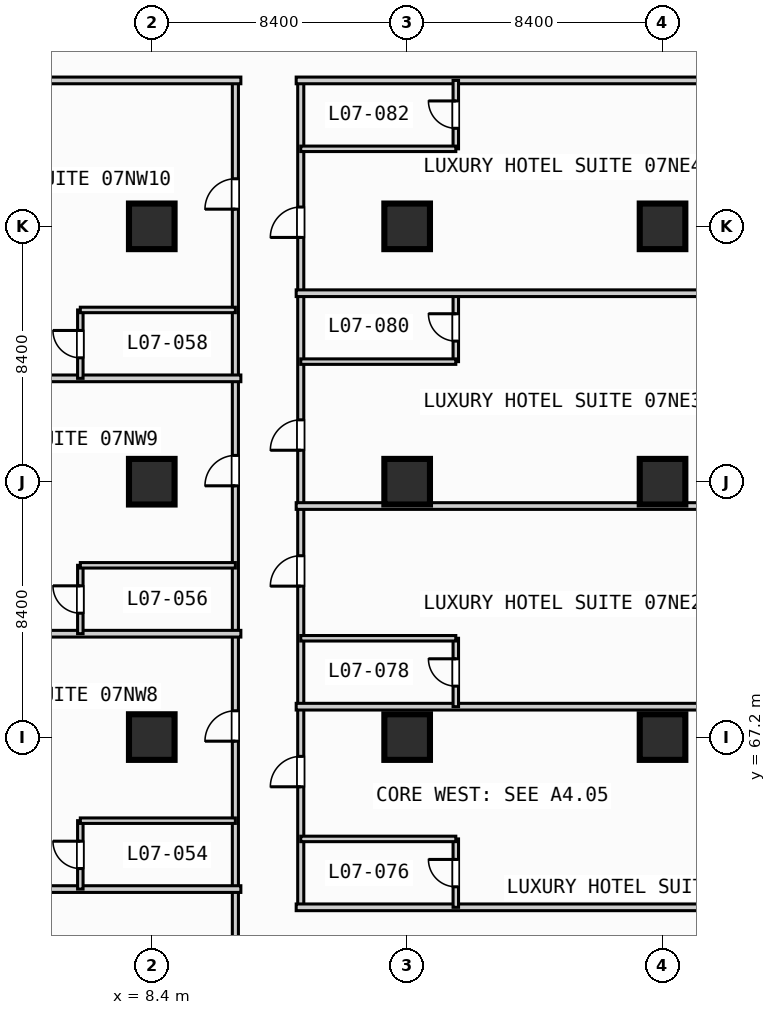
"""IFC4 building model, lengths in metres.
Left out: names, types, materials, properties, quantities, classifications, styles, units other than length and angle.
Written with IfcOpenShell. Run it as: python <this file> out.ifc"""

import sys

from ifc_helpers import new_model, si_unit, direction, frame, frame_2d, origin, origin_2d, place, context, subcontext, project, spatial, rectangle, extrude, element, fill, save


model = new_model("IFC4")
c1 = context("Model", 3, precision=1e-05, world=origin(), true_north=direction((0.0, 1.0)))
c2 = subcontext(c1, "Body", "Model", "MODEL_VIEW")
j1 = project(units=[si_unit("LENGTHUNIT", "METRE"), si_unit("PLANEANGLEUNIT", "RADIAN")], contexts=[c1])
p1 = place(None, origin())
s1 = spatial("IfcSite", under=j1, at=p1, CompositionType="ELEMENT")
p2 = place(p1, origin())
s2 = spatial("IfcBuilding", under=s1, at=p2, CompositionType="ELEMENT")
p3 = place(p2, frame((0.0, 0.0, 35.8)))
s3 = spatial("IfcBuildingStorey", under=s2, at=p3, CompositionType="ELEMENT", Elevation=35.8)
for number, where, z_axis, x_axis in (
    (1, (8.4, 67.2, 0.0), (0.0, 0.0, 1.0), (1.0, 0.0, 0.0)),
    (2, (8.4, 75.6, 0.0), (0.0, 0.0, 1.0), (1.0, 0.0, 0.0)),
    (3, (8.4, 84.0, 0.0), (0.0, 0.0, 1.0), (1.0, 0.0, 0.0)),
    (4, (16.8, 67.2, 0.0), (0.0, 0.0, 1.0), (1.0, 0.0, 0.0)),
    (5, (16.8, 75.6, 0.0), (0.0, 0.0, 1.0), (1.0, 0.0, 0.0)),
    (6, (16.8, 84.0, 0.0), (0.0, 0.0, 1.0), (1.0, 0.0, 0.0)),
    (7, (25.2, 67.2, 0.0), (0.0, 0.0, 1.0), (1.0, 0.0, 0.0)),
    (8, (25.2, 75.6, 0.0), (0.0, 0.0, 1.0), (1.0, 0.0, 0.0)),
    (9, (25.2, 84.0, 0.0), (0.0, 0.0, 1.0), (1.0, 0.0, 0.0)),
):
    element("IfcColumn", number, at=place(p3, frame(where, z_axis=z_axis, x_axis=x_axis)), inside=s3, PredefinedType="COLUMN", context=c2, shape_type="SweptSolid", body=[
        extrude(rectangle(XDim=1.5, YDim=1.5, at=origin_2d()), origin(), (0.0, 0.0, 1.0), 3.8),
    ])
p4 = place(p3, frame((11.15, 3.4, 0.0), z_axis=(0.0, 0.0, 1.0), x_axis=(0.0, 1.0, 0.0)))
e10 = element("IfcWall", 10, at=p4, inside=s3, PredefinedType="PARTITIONING", context=c2, shape_type="SweptSolid", body=[
    extrude(rectangle(XDim=85.4, YDim=0.2, at=frame_2d((42.7, 0.0))), origin(), (0.0, 0.0, 1.0), 3.55),
])
p5 = place(p4, frame((4.865, 0.0, 0.0)))
e11 = element("IfcOpeningElement", 11, at=p5, cuts=e10, PredefinedType="OPENING", context=c2, shape_type="SweptSolid", body=[
    extrude(rectangle(XDim=1.0, YDim=2.15, at=frame_2d((0.5, 1.075))), frame((0.0, 0.11, 0.0), z_axis=(0.0, -1.0, 0.0), x_axis=(1.0, 0.0, 0.0)), (0.0, 0.0, 1.0), 0.22),
])
p6 = place(p4, frame((13.265, 0.0, 0.0)))
e12 = element("IfcOpeningElement", 12, at=p6, cuts=e10, PredefinedType="OPENING", context=c2, shape_type="SweptSolid", body=[
    extrude(rectangle(XDim=1.0, YDim=2.15, at=frame_2d((0.5, 1.075))), frame((0.0, 0.11, 0.0), z_axis=(0.0, -1.0, 0.0), x_axis=(1.0, 0.0, 0.0)), (0.0, 0.0, 1.0), 0.22),
])
p7 = place(p4, frame((21.665, 0.0, 0.0)))
e13 = element("IfcOpeningElement", 13, at=p7, cuts=e10, PredefinedType="OPENING", context=c2, shape_type="SweptSolid", body=[
    extrude(rectangle(XDim=1.0, YDim=2.15, at=frame_2d((0.5, 1.075))), frame((0.0, 0.11, 0.0), z_axis=(0.0, -1.0, 0.0), x_axis=(1.0, 0.0, 0.0)), (0.0, 0.0, 1.0), 0.22),
])
p8 = place(p4, frame((30.065, 0.0, 0.0)))
e14 = element("IfcOpeningElement", 14, at=p8, cuts=e10, PredefinedType="OPENING", context=c2, shape_type="SweptSolid", body=[
    extrude(rectangle(XDim=1.0, YDim=2.15, at=frame_2d((0.5, 1.075))), frame((0.0, 0.11, 0.0), z_axis=(0.0, -1.0, 0.0), x_axis=(1.0, 0.0, 0.0)), (0.0, 0.0, 1.0), 0.22),
])
p9 = place(p4, frame((38.465, 0.0, 0.0)))
e15 = element("IfcOpeningElement", 15, at=p9, cuts=e10, PredefinedType="OPENING", context=c2, shape_type="SweptSolid", body=[
    extrude(rectangle(XDim=1.0, YDim=2.15, at=frame_2d((0.5, 1.075))), frame((0.0, 0.11, 0.0), z_axis=(0.0, -1.0, 0.0), x_axis=(1.0, 0.0, 0.0)), (0.0, 0.0, 1.0), 0.22),
])
p10 = place(p4, frame((46.865, 0.0, 0.0)))
e16 = element("IfcOpeningElement", 16, at=p10, cuts=e10, PredefinedType="OPENING", context=c2, shape_type="SweptSolid", body=[
    extrude(rectangle(XDim=1.0, YDim=2.15, at=frame_2d((0.5, 1.075))), frame((0.0, 0.11, 0.0), z_axis=(0.0, -1.0, 0.0), x_axis=(1.0, 0.0, 0.0)), (0.0, 0.0, 1.0), 0.22),
])
p11 = place(p4, frame((55.265, 0.0, 0.0)))
e17 = element("IfcOpeningElement", 17, at=p11, cuts=e10, PredefinedType="OPENING", context=c2, shape_type="SweptSolid", body=[
    extrude(rectangle(XDim=1.0, YDim=2.15, at=frame_2d((0.5, 1.075))), frame((0.0, 0.11, 0.0), z_axis=(0.0, -1.0, 0.0), x_axis=(1.0, 0.0, 0.0)), (0.0, 0.0, 1.0), 0.22),
])
p12 = place(p4, frame((63.665, 0.0, 0.0)))
e18 = element("IfcOpeningElement", 18, at=p12, cuts=e10, PredefinedType="OPENING", context=c2, shape_type="SweptSolid", body=[
    extrude(rectangle(XDim=1.0, YDim=2.15, at=frame_2d((0.5, 1.075))), frame((0.0, 0.11, 0.0), z_axis=(0.0, -1.0, 0.0), x_axis=(1.0, 0.0, 0.0)), (0.0, 0.0, 1.0), 0.22),
])
p13 = place(p4, frame((72.065, 0.0, 0.0)))
e19 = element("IfcOpeningElement", 19, at=p13, cuts=e10, PredefinedType="OPENING", context=c2, shape_type="SweptSolid", body=[
    extrude(rectangle(XDim=1.0, YDim=2.15, at=frame_2d((0.5, 1.075))), frame((0.0, 0.11, 0.0), z_axis=(0.0, -1.0, 0.0), x_axis=(1.0, 0.0, 0.0)), (0.0, 0.0, 1.0), 0.22),
])
p14 = place(p4, frame((81.165, 0.0, 0.0)))
e20 = element("IfcOpeningElement", 20, at=p14, cuts=e10, PredefinedType="OPENING", context=c2, shape_type="SweptSolid", body=[
    extrude(rectangle(XDim=1.0, YDim=2.15, at=frame_2d((0.5, 1.075))), frame((0.0, 0.11, 0.0), z_axis=(0.0, -1.0, 0.0), x_axis=(1.0, 0.0, 0.0)), (0.0, 0.0, 1.0), 0.22),
])
p15 = place(p3, frame((0.2, 62.2, 0.0), z_axis=(0.0, 0.0, 1.0), x_axis=(1.0, 0.0, 0.0)))
e21 = element("IfcWall", 21, at=p15, inside=s3, PredefinedType="PARTITIONING", context=c2, shape_type="SweptSolid", body=[
    extrude(rectangle(XDim=11.13, YDim=0.22, at=frame_2d((5.565, 0.0))), origin(), (0.0, 0.0, 1.0), 3.55),
])
p16 = place(p3, frame((6.05, 62.2, 0.0), z_axis=(0.0, 0.0, 1.0), x_axis=(0.0, 1.0, 0.0)))
e22 = element("IfcWall", 22, at=p16, inside=s3, PredefinedType="PLUMBINGWALL", context=c2, shape_type="SweptSolid", body=[
    extrude(rectangle(XDim=2.25, YDim=0.18, at=frame_2d((1.125, 0.0))), origin(), (0.0, 0.0, 1.0), 3.55),
])
p17 = place(p16, frame((0.675, 0.0, 0.0)))
e23 = element("IfcOpeningElement", 23, at=p17, cuts=e22, PredefinedType="OPENING", context=c2, shape_type="SweptSolid", body=[
    extrude(rectangle(XDim=0.9, YDim=2.1, at=frame_2d((0.45, 1.05))), frame((0.0, 0.1, 0.0), z_axis=(0.0, -1.0, 0.0), x_axis=(1.0, 0.0, 0.0)), (0.0, 0.0, 1.0), 0.2),
])
p18 = place(p3, frame((6.05, 64.45, 0.0), z_axis=(0.0, 0.0, 1.0), x_axis=(1.0, 0.0, 0.0)))
e24 = element("IfcWall", 24, at=p18, inside=s3, PredefinedType="PLUMBINGWALL", context=c2, shape_type="SweptSolid", body=[
    extrude(rectangle(XDim=5.1, YDim=0.18, at=frame_2d((2.55, 0.0))), origin(), (0.0, 0.0, 1.0), 3.55),
])
p19 = place(p3, frame((0.2, 70.6, 0.0), z_axis=(0.0, 0.0, 1.0), x_axis=(1.0, 0.0, 0.0)))
e25 = element("IfcWall", 25, at=p19, inside=s3, PredefinedType="PARTITIONING", context=c2, shape_type="SweptSolid", body=[
    extrude(rectangle(XDim=11.13, YDim=0.22, at=frame_2d((5.565, 0.0))), origin(), (0.0, 0.0, 1.0), 3.55),
])
p20 = place(p3, frame((6.05, 70.6, 0.0), z_axis=(0.0, 0.0, 1.0), x_axis=(0.0, 1.0, 0.0)))
e26 = element("IfcWall", 26, at=p20, inside=s3, PredefinedType="PLUMBINGWALL", context=c2, shape_type="SweptSolid", body=[
    extrude(rectangle(XDim=2.25, YDim=0.18, at=frame_2d((1.125, 0.0))), origin(), (0.0, 0.0, 1.0), 3.55),
])
p21 = place(p20, frame((0.675, 0.0, 0.0)))
e27 = element("IfcOpeningElement", 27, at=p21, cuts=e26, PredefinedType="OPENING", context=c2, shape_type="SweptSolid", body=[
    extrude(rectangle(XDim=0.9, YDim=2.1, at=frame_2d((0.45, 1.05))), frame((0.0, 0.1, 0.0), z_axis=(0.0, -1.0, 0.0), x_axis=(1.0, 0.0, 0.0)), (0.0, 0.0, 1.0), 0.2),
])
p22 = place(p3, frame((6.05, 72.85, 0.0), z_axis=(0.0, 0.0, 1.0), x_axis=(1.0, 0.0, 0.0)))
e28 = element("IfcWall", 28, at=p22, inside=s3, PredefinedType="PLUMBINGWALL", context=c2, shape_type="SweptSolid", body=[
    extrude(rectangle(XDim=5.1, YDim=0.18, at=frame_2d((2.55, 0.0))), origin(), (0.0, 0.0, 1.0), 3.55),
])
for number, where, z_axis, x_axis in (
    (29, (0.2, 79.0, 0.0), (0.0, 0.0, 1.0), (1.0, 0.0, 0.0)),
    (30, (0.2, 88.8, 0.0), (0.0, 0.0, 1.0), (1.0, 0.0, 0.0)),
):
    element("IfcWall", number, at=place(p3, frame(where, z_axis=z_axis, x_axis=x_axis)), inside=s3, PredefinedType="PARTITIONING", context=c2, shape_type="SweptSolid", body=[
        extrude(rectangle(XDim=11.13, YDim=0.22, at=frame_2d((5.565, 0.0))), origin(), (0.0, 0.0, 1.0), 3.55),
    ])
p23 = place(p3, frame((6.05, 79.0, 0.0), z_axis=(0.0, 0.0, 1.0), x_axis=(0.0, 1.0, 0.0)))
e31 = element("IfcWall", 31, at=p23, inside=s3, PredefinedType="PLUMBINGWALL", context=c2, shape_type="SweptSolid", body=[
    extrude(rectangle(XDim=2.25, YDim=0.18, at=frame_2d((1.125, 0.0))), origin(), (0.0, 0.0, 1.0), 3.55),
])
p24 = place(p23, frame((0.675, 0.0, 0.0)))
e32 = element("IfcOpeningElement", 32, at=p24, cuts=e31, PredefinedType="OPENING", context=c2, shape_type="SweptSolid", body=[
    extrude(rectangle(XDim=0.9, YDim=2.1, at=frame_2d((0.45, 1.05))), frame((0.0, 0.1, 0.0), z_axis=(0.0, -1.0, 0.0), x_axis=(1.0, 0.0, 0.0)), (0.0, 0.0, 1.0), 0.2),
])
p25 = place(p3, frame((6.05, 81.25, 0.0), z_axis=(0.0, 0.0, 1.0), x_axis=(1.0, 0.0, 0.0)))
e33 = element("IfcWall", 33, at=p25, inside=s3, PredefinedType="PLUMBINGWALL", context=c2, shape_type="SweptSolid", body=[
    extrude(rectangle(XDim=5.1, YDim=0.18, at=frame_2d((2.55, 0.0))), origin(), (0.0, 0.0, 1.0), 3.55),
])
p26 = place(p3, frame((13.3, 61.6, 0.0), z_axis=(0.0, 0.0, 1.0), x_axis=(0.0, 1.0, 0.0)))
e34 = element("IfcWall", 34, at=p26, inside=s3, PredefinedType="PARTITIONING", context=c2, shape_type="SweptSolid", body=[
    extrude(rectangle(XDim=27.2, YDim=0.2, at=frame_2d((13.6, 0.0))), origin(), (0.0, 0.0, 1.0), 3.55),
])
p27 = place(p26, frame((3.965, 0.0, 0.0)))
e35 = element("IfcOpeningElement", 35, at=p27, cuts=e34, PredefinedType="OPENING", context=c2, shape_type="SweptSolid", body=[
    extrude(rectangle(XDim=1.0, YDim=2.15, at=frame_2d((0.5, 1.075))), frame((0.0, 0.11, 0.0), z_axis=(0.0, -1.0, 0.0), x_axis=(1.0, 0.0, 0.0)), (0.0, 0.0, 1.0), 0.22),
])
p28 = place(p26, frame((10.565, 0.0, 0.0)))
e36 = element("IfcOpeningElement", 36, at=p28, cuts=e34, PredefinedType="OPENING", context=c2, shape_type="SweptSolid", body=[
    extrude(rectangle(XDim=1.0, YDim=2.15, at=frame_2d((0.5, 1.075))), frame((0.0, 0.11, 0.0), z_axis=(0.0, -1.0, 0.0), x_axis=(1.0, 0.0, 0.0)), (0.0, 0.0, 1.0), 0.22),
])
p29 = place(p26, frame((15.035, 0.0, 0.0)))
e37 = element("IfcOpeningElement", 37, at=p29, cuts=e34, PredefinedType="OPENING", context=c2, shape_type="SweptSolid", body=[
    extrude(rectangle(XDim=1.0, YDim=2.15, at=frame_2d((0.5, 1.075))), frame((0.0, 0.11, 0.0), z_axis=(0.0, -1.0, 0.0), x_axis=(1.0, 0.0, 0.0)), (0.0, 0.0, 1.0), 0.22),
])
p30 = place(p26, frame((22.035, 0.0, 0.0)))
e38 = element("IfcOpeningElement", 38, at=p30, cuts=e34, PredefinedType="OPENING", context=c2, shape_type="SweptSolid", body=[
    extrude(rectangle(XDim=1.0, YDim=2.15, at=frame_2d((0.5, 1.075))), frame((0.0, 0.11, 0.0), z_axis=(0.0, -1.0, 0.0), x_axis=(1.0, 0.0, 0.0)), (0.0, 0.0, 1.0), 0.22),
])
p31 = place(p3, frame((13.15, 61.6, 0.0), z_axis=(0.0, 0.0, 1.0), x_axis=(1.0, 0.0, 0.0)))
e39 = element("IfcWall", 39, at=p31, inside=s3, PredefinedType="PARTITIONING", context=c2, shape_type="SweptSolid", body=[
    extrude(rectangle(XDim=20.28, YDim=0.22, at=frame_2d((10.14, 0.0))), origin(), (0.0, 0.0, 1.0), 3.55),
])
p32 = place(p3, frame((18.4, 61.6, 0.0), z_axis=(0.0, 0.0, 1.0), x_axis=(0.0, 1.0, 0.0)))
e40 = element("IfcWall", 40, at=p32, inside=s3, PredefinedType="PLUMBINGWALL", context=c2, shape_type="SweptSolid", body=[
    extrude(rectangle(XDim=2.25, YDim=0.18, at=frame_2d((1.125, 0.0))), origin(), (0.0, 0.0, 1.0), 3.55),
])
p33 = place(p32, frame((0.675, 0.0, 0.0)))
e41 = element("IfcOpeningElement", 41, at=p33, cuts=e40, PredefinedType="OPENING", context=c2, shape_type="SweptSolid", body=[
    extrude(rectangle(XDim=0.9, YDim=2.1, at=frame_2d((0.45, 1.05))), frame((0.0, 0.1, 0.0), z_axis=(0.0, -1.0, 0.0), x_axis=(1.0, 0.0, 0.0)), (0.0, 0.0, 1.0), 0.2),
])
p34 = place(p3, frame((13.3, 63.85, 0.0), z_axis=(0.0, 0.0, 1.0), x_axis=(1.0, 0.0, 0.0)))
e42 = element("IfcWall", 42, at=p34, inside=s3, PredefinedType="PLUMBINGWALL", context=c2, shape_type="SweptSolid", body=[
    extrude(rectangle(XDim=5.1, YDim=0.18, at=frame_2d((2.55, 0.0))), origin(), (0.0, 0.0, 1.0), 3.55),
])
p35 = place(p3, frame((13.15, 68.2, 0.0), z_axis=(0.0, 0.0, 1.0), x_axis=(1.0, 0.0, 0.0)))
e43 = element("IfcWall", 43, at=p35, inside=s3, PredefinedType="PARTITIONING", context=c2, shape_type="SweptSolid", body=[
    extrude(rectangle(XDim=20.28, YDim=0.22, at=frame_2d((10.14, 0.0))), origin(), (0.0, 0.0, 1.0), 3.55),
])
p36 = place(p3, frame((18.4, 68.2, 0.0), z_axis=(0.0, 0.0, 1.0), x_axis=(0.0, 1.0, 0.0)))
e44 = element("IfcWall", 44, at=p36, inside=s3, PredefinedType="PLUMBINGWALL", context=c2, shape_type="SweptSolid", body=[
    extrude(rectangle(XDim=2.25, YDim=0.18, at=frame_2d((1.125, 0.0))), origin(), (0.0, 0.0, 1.0), 3.55),
])
p37 = place(p36, frame((0.675, 0.0, 0.0)))
e45 = element("IfcOpeningElement", 45, at=p37, cuts=e44, PredefinedType="OPENING", context=c2, shape_type="SweptSolid", body=[
    extrude(rectangle(XDim=0.9, YDim=2.1, at=frame_2d((0.45, 1.05))), frame((0.0, 0.1, 0.0), z_axis=(0.0, -1.0, 0.0), x_axis=(1.0, 0.0, 0.0)), (0.0, 0.0, 1.0), 0.2),
])
p38 = place(p3, frame((13.3, 70.45, 0.0), z_axis=(0.0, 0.0, 1.0), x_axis=(1.0, 0.0, 0.0)))
e46 = element("IfcWall", 46, at=p38, inside=s3, PredefinedType="PLUMBINGWALL", context=c2, shape_type="SweptSolid", body=[
    extrude(rectangle(XDim=5.1, YDim=0.18, at=frame_2d((2.55, 0.0))), origin(), (0.0, 0.0, 1.0), 3.55),
])
p39 = place(p3, frame((13.15, 74.8, 0.0), z_axis=(0.0, 0.0, 1.0), x_axis=(1.0, 0.0, 0.0)))
e47 = element("IfcWall", 47, at=p39, inside=s3, PredefinedType="PARTITIONING", context=c2, shape_type="SweptSolid", body=[
    extrude(rectangle(XDim=20.28, YDim=0.22, at=frame_2d((10.14, 0.0))), origin(), (0.0, 0.0, 1.0), 3.55),
])
p40 = place(p3, frame((18.4, 79.55, 0.0), z_axis=(0.0, 0.0, 1.0), x_axis=(0.0, 1.0, 0.0)))
e48 = element("IfcWall", 48, at=p40, inside=s3, PredefinedType="PLUMBINGWALL", context=c2, shape_type="SweptSolid", body=[
    extrude(rectangle(XDim=2.25, YDim=0.18, at=frame_2d((1.125, 0.0))), origin(), (0.0, 0.0, 1.0), 3.55),
])
p41 = place(p40, frame((0.675, 0.0, 0.0)))
e49 = element("IfcOpeningElement", 49, at=p41, cuts=e48, PredefinedType="OPENING", context=c2, shape_type="SweptSolid", body=[
    extrude(rectangle(XDim=0.9, YDim=2.1, at=frame_2d((0.45, 1.05))), frame((0.0, 0.1, 0.0), z_axis=(0.0, -1.0, 0.0), x_axis=(1.0, 0.0, 0.0)), (0.0, 0.0, 1.0), 0.2),
])
p42 = place(p3, frame((13.3, 79.55, 0.0), z_axis=(0.0, 0.0, 1.0), x_axis=(1.0, 0.0, 0.0)))
e50 = element("IfcWall", 50, at=p42, inside=s3, PredefinedType="PLUMBINGWALL", context=c2, shape_type="SweptSolid", body=[
    extrude(rectangle(XDim=5.1, YDim=0.18, at=frame_2d((2.55, 0.0))), origin(), (0.0, 0.0, 1.0), 3.55),
])
for number, where, z_axis, x_axis in (
    (51, (13.15, 81.8, 0.0), (0.0, 0.0, 1.0), (1.0, 0.0, 0.0)),
    (52, (13.15, 88.8, 0.0), (0.0, 0.0, 1.0), (1.0, 0.0, 0.0)),
):
    element("IfcWall", number, at=place(p3, frame(where, z_axis=z_axis, x_axis=x_axis)), inside=s3, PredefinedType="PARTITIONING", context=c2, shape_type="SweptSolid", body=[
        extrude(rectangle(XDim=20.28, YDim=0.22, at=frame_2d((10.14, 0.0))), origin(), (0.0, 0.0, 1.0), 3.55),
    ])
p43 = place(p3, frame((18.4, 86.55, 0.0), z_axis=(0.0, 0.0, 1.0), x_axis=(0.0, 1.0, 0.0)))
e53 = element("IfcWall", 53, at=p43, inside=s3, PredefinedType="PLUMBINGWALL", context=c2, shape_type="SweptSolid", body=[
    extrude(rectangle(XDim=2.25, YDim=0.18, at=frame_2d((1.125, 0.0))), origin(), (0.0, 0.0, 1.0), 3.55),
])
p44 = place(p43, frame((0.675, 0.0, 0.0)))
e54 = element("IfcOpeningElement", 54, at=p44, cuts=e53, PredefinedType="OPENING", context=c2, shape_type="SweptSolid", body=[
    extrude(rectangle(XDim=0.9, YDim=2.1, at=frame_2d((0.45, 1.05))), frame((0.0, 0.1, 0.0), z_axis=(0.0, -1.0, 0.0), x_axis=(1.0, 0.0, 0.0)), (0.0, 0.0, 1.0), 0.2),
])
p45 = place(p3, frame((13.3, 86.55, 0.0), z_axis=(0.0, 0.0, 1.0), x_axis=(1.0, 0.0, 0.0)))
e55 = element("IfcWall", 55, at=p45, inside=s3, PredefinedType="PLUMBINGWALL", context=c2, shape_type="SweptSolid", body=[
    extrude(rectangle(XDim=5.1, YDim=0.18, at=frame_2d((2.55, 0.0))), origin(), (0.0, 0.0, 1.0), 3.55),
])
p46 = place(p12, origin())
e56 = element("IfcDoor", 56, at=p46, inside=s3, OperationType="SINGLE_SWING_LEFT", PredefinedType="DOOR", context=c2, shape_type="SweptSolid", body=[
    extrude(rectangle(XDim=1.0, YDim=2.15, at=frame_2d((0.5, 1.075))), frame((0.0, 0.025, 0.0), z_axis=(0.0, -1.0, 0.0), x_axis=(1.0, 0.0, 0.0)), (0.0, 0.0, 1.0), 0.05),
])
fill(e18, e56)
p47 = place(p13, origin())
e57 = element("IfcDoor", 57, at=p47, inside=s3, OperationType="SINGLE_SWING_LEFT", PredefinedType="DOOR", context=c2, shape_type="SweptSolid", body=[
    extrude(rectangle(XDim=1.0, YDim=2.15, at=frame_2d((0.5, 1.075))), frame((0.0, 0.025, 0.0), z_axis=(0.0, -1.0, 0.0), x_axis=(1.0, 0.0, 0.0)), (0.0, 0.0, 1.0), 0.05),
])
fill(e19, e57)
p48 = place(p14, origin())
e58 = element("IfcDoor", 58, at=p48, inside=s3, OperationType="SINGLE_SWING_LEFT", PredefinedType="DOOR", context=c2, shape_type="SweptSolid", body=[
    extrude(rectangle(XDim=1.0, YDim=2.15, at=frame_2d((0.5, 1.075))), frame((0.0, 0.025, 0.0), z_axis=(0.0, -1.0, 0.0), x_axis=(1.0, 0.0, 0.0)), (0.0, 0.0, 1.0), 0.05),
])
fill(e20, e58)
p49 = place(p17, origin())
e59 = element("IfcDoor", 59, at=p49, inside=s3, OperationType="SINGLE_SWING_RIGHT", PredefinedType="DOOR", context=c2, shape_type="SweptSolid", body=[
    extrude(rectangle(XDim=0.9, YDim=2.1, at=frame_2d((0.45, 1.05))), frame((0.0, 0.025, 0.0), z_axis=(0.0, -1.0, 0.0), x_axis=(1.0, 0.0, 0.0)), (0.0, 0.0, 1.0), 0.05),
])
fill(e23, e59)
p50 = place(p21, origin())
e60 = element("IfcDoor", 60, at=p50, inside=s3, OperationType="SINGLE_SWING_RIGHT", PredefinedType="DOOR", context=c2, shape_type="SweptSolid", body=[
    extrude(rectangle(XDim=0.9, YDim=2.1, at=frame_2d((0.45, 1.05))), frame((0.0, 0.025, 0.0), z_axis=(0.0, -1.0, 0.0), x_axis=(1.0, 0.0, 0.0)), (0.0, 0.0, 1.0), 0.05),
])
fill(e27, e60)
p51 = place(p24, origin())
e61 = element("IfcDoor", 61, at=p51, inside=s3, OperationType="SINGLE_SWING_RIGHT", PredefinedType="DOOR", context=c2, shape_type="SweptSolid", body=[
    extrude(rectangle(XDim=0.9, YDim=2.1, at=frame_2d((0.45, 1.05))), frame((0.0, 0.025, 0.0), z_axis=(0.0, -1.0, 0.0), x_axis=(1.0, 0.0, 0.0)), (0.0, 0.0, 1.0), 0.05),
])
fill(e32, e61)
p52 = place(p27, origin())
e62 = element("IfcDoor", 62, at=p52, inside=s3, OperationType="SINGLE_SWING_LEFT", PredefinedType="DOOR", context=c2, shape_type="SweptSolid", body=[
    extrude(rectangle(XDim=1.0, YDim=2.15, at=frame_2d((0.5, 1.075))), frame((0.0, 0.025, 0.0), z_axis=(0.0, -1.0, 0.0), x_axis=(1.0, 0.0, 0.0)), (0.0, 0.0, 1.0), 0.05),
])
fill(e35, e62)
p53 = place(p28, origin())
e63 = element("IfcDoor", 63, at=p53, inside=s3, OperationType="SINGLE_SWING_LEFT", PredefinedType="DOOR", context=c2, shape_type="SweptSolid", body=[
    extrude(rectangle(XDim=1.0, YDim=2.15, at=frame_2d((0.5, 1.075))), frame((0.0, 0.025, 0.0), z_axis=(0.0, -1.0, 0.0), x_axis=(1.0, 0.0, 0.0)), (0.0, 0.0, 1.0), 0.05),
])
fill(e36, e63)
p54 = place(p29, origin())
e64 = element("IfcDoor", 64, at=p54, inside=s3, OperationType="SINGLE_SWING_LEFT", PredefinedType="DOOR", context=c2, shape_type="SweptSolid", body=[
    extrude(rectangle(XDim=1.0, YDim=2.15, at=frame_2d((0.5, 1.075))), frame((0.0, 0.025, 0.0), z_axis=(0.0, -1.0, 0.0), x_axis=(1.0, 0.0, 0.0)), (0.0, 0.0, 1.0), 0.05),
])
fill(e37, e64)
p55 = place(p30, origin())
e65 = element("IfcDoor", 65, at=p55, inside=s3, OperationType="SINGLE_SWING_LEFT", PredefinedType="DOOR", context=c2, shape_type="SweptSolid", body=[
    extrude(rectangle(XDim=1.0, YDim=2.15, at=frame_2d((0.5, 1.075))), frame((0.0, 0.025, 0.0), z_axis=(0.0, -1.0, 0.0), x_axis=(1.0, 0.0, 0.0)), (0.0, 0.0, 1.0), 0.05),
])
fill(e38, e65)
p56 = place(p33, origin())
e66 = element("IfcDoor", 66, at=p56, inside=s3, OperationType="SINGLE_SWING_RIGHT", PredefinedType="DOOR", context=c2, shape_type="SweptSolid", body=[
    extrude(rectangle(XDim=0.9, YDim=2.1, at=frame_2d((0.45, 1.05))), frame((0.0, 0.025, 0.0), z_axis=(0.0, -1.0, 0.0), x_axis=(1.0, 0.0, 0.0)), (0.0, 0.0, 1.0), 0.05),
])
fill(e41, e66)
p57 = place(p37, origin())
e67 = element("IfcDoor", 67, at=p57, inside=s3, OperationType="SINGLE_SWING_RIGHT", PredefinedType="DOOR", context=c2, shape_type="SweptSolid", body=[
    extrude(rectangle(XDim=0.9, YDim=2.1, at=frame_2d((0.45, 1.05))), frame((0.0, 0.025, 0.0), z_axis=(0.0, -1.0, 0.0), x_axis=(1.0, 0.0, 0.0)), (0.0, 0.0, 1.0), 0.05),
])
fill(e45, e67)
p58 = place(p41, origin())
e68 = element("IfcDoor", 68, at=p58, inside=s3, OperationType="SINGLE_SWING_RIGHT", PredefinedType="DOOR", context=c2, shape_type="SweptSolid", body=[
    extrude(rectangle(XDim=0.9, YDim=2.1, at=frame_2d((0.45, 1.05))), frame((0.0, 0.025, 0.0), z_axis=(0.0, -1.0, 0.0), x_axis=(1.0, 0.0, 0.0)), (0.0, 0.0, 1.0), 0.05),
])
fill(e49, e68)
p59 = place(p44, origin())
e69 = element("IfcDoor", 69, at=p59, inside=s3, OperationType="SINGLE_SWING_RIGHT", PredefinedType="DOOR", context=c2, shape_type="SweptSolid", body=[
    extrude(rectangle(XDim=0.9, YDim=2.1, at=frame_2d((0.45, 1.05))), frame((0.0, 0.025, 0.0), z_axis=(0.0, -1.0, 0.0), x_axis=(1.0, 0.0, 0.0)), (0.0, 0.0, 1.0), 0.05),
])
fill(e54, e69)
save(model, sys.argv[1])
